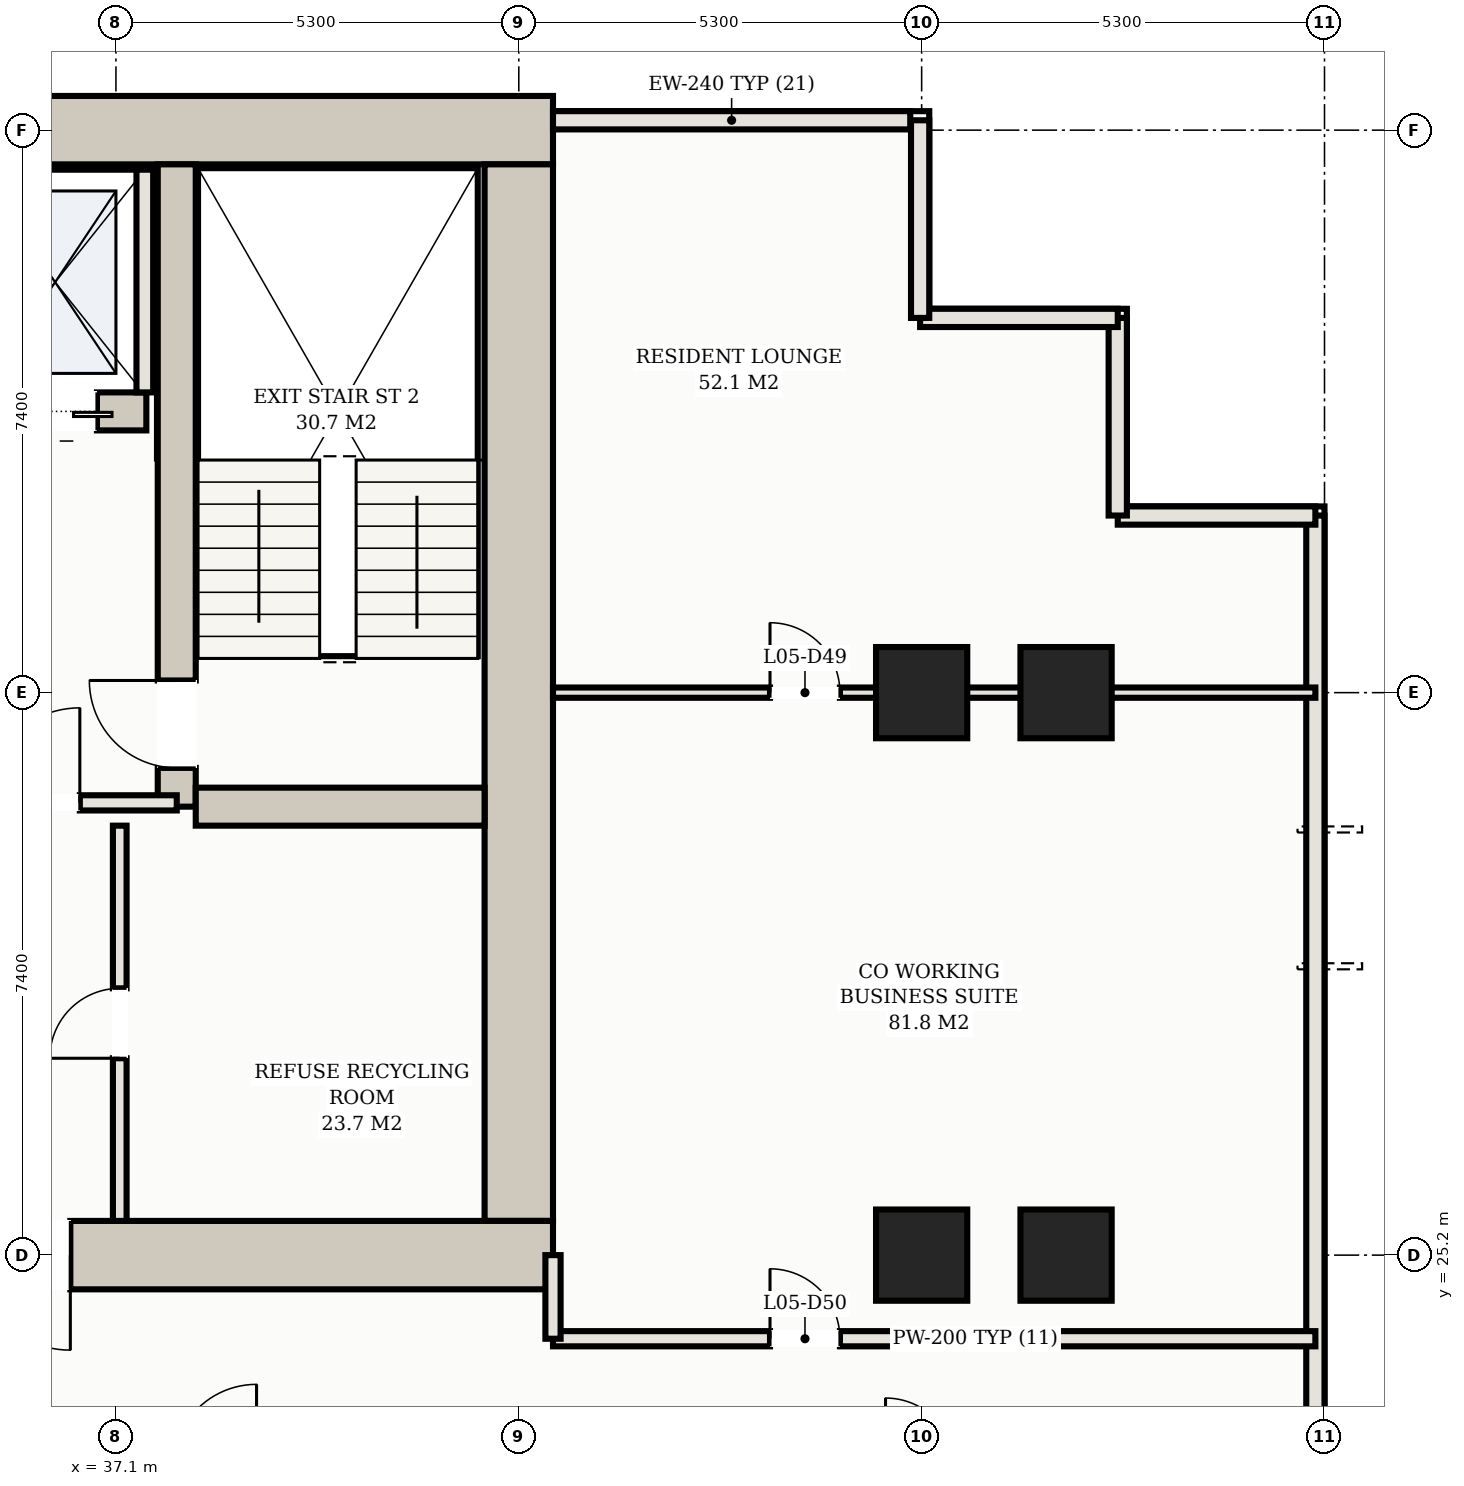
"""IFC4 building model, lengths in metres.
Left out: names, types, materials, properties, quantities, classifications, styles, units other than length and angle.
Written with IfcOpenShell. Run it as: python <this file> out.ifc"""

import sys

from ifc_helpers import new_model, si_unit, direction, frame, frame_2d, origin, origin_2d, place, context, subcontext, project, spatial, rectangle, hollow_rectangle, extrude, element, fill, save


model = new_model("IFC4")
c1 = context("Model", 3, precision=1e-05, world=origin(), true_north=direction((0.0, 1.0)))
c2 = subcontext(c1, "Body", "Model", "MODEL_VIEW")
j1 = project(units=[si_unit("LENGTHUNIT", "METRE"), si_unit("PLANEANGLEUNIT", "RADIAN")], contexts=[c1])
p1 = place(None, origin())
s1 = spatial("IfcSite", under=j1, at=p1, CompositionType="ELEMENT")
p2 = place(p1, origin())
s2 = spatial("IfcBuilding", under=s1, at=p2, CompositionType="ELEMENT")
p3 = place(p2, frame((0.0, 0.0, 24.2)))
s3 = spatial("IfcBuildingStorey", under=s2, at=p3, CompositionType="ELEMENT", Elevation=24.2)
p4 = place(p3, frame((10.15, 40.0, 0.0), z_axis=(0.0, 0.0, 1.0), x_axis=(1.0, 0.0, 0.0)))
e1 = element("IfcWall", 1, at=p4, inside=s3, PredefinedType="SHEAR", context=c2, shape_type="SweptSolid", body=[
    extrude(rectangle(XDim=32.7, YDim=0.9, at=frame_2d((16.35, 0.0))), origin(), (0.0, 0.0, 1.0), 3.08),
])
p5 = place(p3, frame((42.4, 25.65, 0.0), z_axis=(0.0, 0.0, 1.0), x_axis=(0.0, 1.0, 0.0)))
e2 = element("IfcWall", 2, at=p5, inside=s3, PredefinedType="SHEAR", context=c2, shape_type="SweptSolid", body=[
    extrude(rectangle(XDim=13.9, YDim=0.9, at=frame_2d((6.95, 0.0))), origin(), (0.0, 0.0, 1.0), 3.08),
])
p6 = place(p3, frame((34.6, 25.2, 0.0), z_axis=(0.0, 0.0, 1.0), x_axis=(1.0, 0.0, 0.0)))
e3 = element("IfcWall", 3, at=p6, inside=s3, PredefinedType="SHEAR", context=c2, shape_type="SweptSolid", body=[
    extrude(rectangle(XDim=8.25, YDim=0.9, at=frame_2d((4.125, 0.0))), origin(), (0.0, 0.0, 1.0), 3.08),
])
p7 = place(p6, frame((0.65, 0.0, 0.0)))
e4 = element("IfcOpeningElement", 4, at=p7, cuts=e3, PredefinedType="OPENING", context=c2, shape_type="SweptSolid", body=[
    extrude(rectangle(XDim=1.25, YDim=2.2, at=frame_2d((0.625, 1.1))), frame((0.0, 0.46, 0.0), z_axis=(0.0, -1.0, 0.0), x_axis=(1.0, 0.0, 0.0)), (0.0, 0.0, 1.0), 0.92),
])
p8 = place(p3, frame((37.9, 31.1, 0.0), z_axis=(0.0, 0.0, 1.0), x_axis=(0.0, 1.0, 0.0)))
e5 = element("IfcWall", 5, at=p8, inside=s3, PredefinedType="SHEAR", context=c2, shape_type="SweptSolid", body=[
    extrude(rectangle(XDim=8.45, YDim=0.5, at=frame_2d((4.225, 0.0))), origin(), (0.0, 0.0, 1.0), 3.08),
])
p9 = place(p8, frame((0.51, 0.0, 0.0)))
e6 = element("IfcOpeningElement", 6, at=p9, cuts=e5, PredefinedType="OPENING", context=c2, shape_type="SweptSolid", body=[
    extrude(rectangle(XDim=1.15, YDim=2.2, at=frame_2d((0.575, 1.1))), frame((0.0, 0.26, 0.0), z_axis=(0.0, -1.0, 0.0), x_axis=(1.0, 0.0, 0.0)), (0.0, 0.0, 1.0), 0.52),
])
p10 = place(p3, frame((38.15, 31.1, 0.0), z_axis=(0.0, 0.0, 1.0), x_axis=(1.0, 0.0, 0.0)))
e7 = element("IfcWall", 7, at=p10, inside=s3, PredefinedType="SHEAR", context=c2, shape_type="SweptSolid", body=[
    extrude(rectangle(XDim=3.8, YDim=0.5, at=frame_2d((1.9, 0.0))), origin(), (0.0, 0.0, 1.0), 3.08),
])
p11 = place(p3, frame((15.5, 36.3, 0.0), z_axis=(0.0, 0.0, 1.0), x_axis=(1.0, 0.0, 0.0)))
e8 = element("IfcWall", 8, at=p11, inside=s3, PredefinedType="SHEAR", context=c2, shape_type="SweptSolid", body=[
    extrude(rectangle(XDim=22.0, YDim=0.5, at=frame_2d((11.0, 0.0))), origin(), (0.0, 0.0, 1.0), 3.08),
])
p12 = place(p11, frame((0.65, 0.0, 0.0)))
e9 = element("IfcOpeningElement", 9, at=p12, cuts=e8, PredefinedType="OPENING", context=c2, shape_type="SweptSolid", body=[
    extrude(rectangle(XDim=1.1, YDim=2.15, at=frame_2d((0.55, 1.075))), frame((0.0, 0.26, 0.0), z_axis=(0.0, -1.0, 0.0), x_axis=(1.0, 0.0, 0.0)), (0.0, 0.0, 1.0), 0.52),
])
p13 = place(p11, frame((20.25, 0.0, 0.0)))
e10 = element("IfcOpeningElement", 10, at=p13, cuts=e8, PredefinedType="OPENING", context=c2, shape_type="SweptSolid", body=[
    extrude(rectangle(XDim=1.1, YDim=2.15, at=frame_2d((0.55, 1.075))), frame((0.0, 0.26, 0.0), z_axis=(0.0, -1.0, 0.0), x_axis=(1.0, 0.0, 0.0)), (0.0, 0.0, 1.0), 0.52),
])
p14 = place(p11, frame((17.05, 0.0, 0.0)))
e11 = element("IfcOpeningElement", 11, at=p14, cuts=e8, PredefinedType="OPENING", context=c2, shape_type="SweptSolid", body=[
    extrude(rectangle(XDim=1.3, YDim=2.2, at=frame_2d((0.65, 1.1))), frame((0.0, 0.26, 0.0), z_axis=(0.0, -1.0, 0.0), x_axis=(1.0, 0.0, 0.0)), (0.0, 0.0, 1.0), 0.52),
])
for number, where, z_axis, x_axis in (
    (12, (47.7, 25.2, 0.0), (0.0, 0.0, 1.0), (1.0, 0.0, 0.0)),
    (13, (47.7, 32.6, 0.0), (0.0, 0.0, 1.0), (1.0, 0.0, 0.0)),
    (14, (49.6, 25.2, 0.0), (0.0, 0.0, 1.0), (1.0, 0.0, 0.0)),
    (15, (49.6, 32.6, 0.0), (0.0, 0.0, 1.0), (1.0, 0.0, 0.0)),
):
    element("IfcColumn", number, at=place(p3, frame(where, z_axis=z_axis, x_axis=x_axis)), inside=s3, PredefinedType="COLUMN", context=c2, shape_type="SweptSolid", body=[
        extrude(hollow_rectangle(XDim=1.2, YDim=1.2, WallThickness=0.04, at=origin_2d()), origin(), (0.0, 0.0, 1.0), 3.3),
    ])
p15 = place(p3, frame((37.48, 36.55, 0.0), z_axis=(0.0, 0.0, 1.0), x_axis=(0.0, 1.0, 0.0)))
e16 = element("IfcWall", 16, at=p15, inside=s3, PredefinedType="SOLIDWALL", context=c2, shape_type="SweptSolid", body=[
    extrude(rectangle(XDim=2.93, YDim=0.22, at=frame_2d((1.465, 0.0))), origin(), (0.0, 0.0, 1.0), 3.08),
])
p16 = place(p3, frame((52.88, 6.12, 0.0), z_axis=(0.0, 0.0, 1.0), x_axis=(0.0, 1.0, 0.0)))
e17 = element("IfcWall", 17, at=p16, inside=s3, PredefinedType="SOLIDWALL", context=c2, shape_type="SweptSolid", body=[
    extrude(rectangle(XDim=28.81, YDim=0.24, at=frame_2d((14.405, 0.0))), origin(), (0.0, 0.0, 1.0), 3.08),
])
p17 = place(p3, frame((52.88, 34.93, 0.0), z_axis=(0.0, 0.0, 1.0), x_axis=(-1.0, 0.0, 0.0)))
e18 = element("IfcWall", 18, at=p17, inside=s3, PredefinedType="SOLIDWALL", context=c2, shape_type="SweptSolid", body=[
    extrude(rectangle(XDim=2.6, YDim=0.24, at=frame_2d((1.3, 0.0))), origin(), (0.0, 0.0, 1.0), 3.08),
])
for number, where, z_axis, x_axis in (
    (19, (50.28, 34.93, 0.0), (0.0, 0.0, 1.0), (0.0, 1.0, 0.0)),
    (20, (50.28, 37.53, 0.0), (0.0, 0.0, 1.0), (-1.0, 0.0, 0.0)),
):
    element("IfcWall", number, at=place(p3, frame(where, z_axis=z_axis, x_axis=x_axis)), inside=s3, PredefinedType="SOLIDWALL", context=c2, shape_type="SweptSolid", body=[
        extrude(rectangle(XDim=2.6, YDim=0.24, at=frame_2d((1.3, 0.0))), origin(), (0.0, 0.0, 1.0), 3.08),
    ])
p18 = place(p3, frame((47.68, 37.53, 0.0), z_axis=(0.0, 0.0, 1.0), x_axis=(0.0, 1.0, 0.0)))
e21 = element("IfcWall", 21, at=p18, inside=s3, PredefinedType="SOLIDWALL", context=c2, shape_type="SweptSolid", body=[
    extrude(rectangle(XDim=2.6, YDim=0.24, at=frame_2d((1.3, 0.0))), origin(), (0.0, 0.0, 1.0), 3.08),
])
p19 = place(p3, frame((47.55, 40.13, 0.0), z_axis=(0.0, 0.0, 1.0), x_axis=(-1.0, 0.0, 0.0)))
e22 = element("IfcWall", 22, at=p19, inside=s3, PredefinedType="SOLIDWALL", context=c2, shape_type="SweptSolid", body=[
    extrude(rectangle(XDim=4.7, YDim=0.24, at=frame_2d((2.35, 0.0))), origin(), (0.0, 0.0, 1.0), 3.08),
])
p20 = place(p3, frame((34.65, 31.15, 0.0), z_axis=(0.0, 0.0, 1.0), x_axis=(1.0, 0.0, 0.0)))
e23 = element("IfcWall", 23, at=p20, inside=s3, PredefinedType="PARTITIONING", context=c2, shape_type="SweptSolid", body=[
    extrude(rectangle(XDim=3.25, YDim=0.2, at=frame_2d((1.625, 0.0))), origin(), (0.0, 0.0, 1.0), 2.57),
])
p21 = place(p20, frame((0.725, 0.0, 0.0)))
e24 = element("IfcOpeningElement", 24, at=p21, cuts=e23, PredefinedType="OPENING", context=c2, shape_type="SweptSolid", body=[
    extrude(rectangle(XDim=1.25, YDim=2.2, at=frame_2d((0.625, 1.1))), frame((0.0, 0.11, 0.0), z_axis=(0.0, -1.0, 0.0), x_axis=(1.0, 0.0, 0.0)), (0.0, 0.0, 1.0), 0.22),
])
p22 = place(p3, frame((37.15, 25.65, 0.0), z_axis=(0.0, 0.0, 1.0), x_axis=(0.0, 1.0, 0.0)))
e25 = element("IfcWall", 25, at=p22, inside=s3, PredefinedType="PARTITIONING", context=c2, shape_type="SweptSolid", body=[
    extrude(rectangle(XDim=5.2, YDim=0.18, at=frame_2d((2.6, 0.0))), origin(), (0.0, 0.0, 1.0), 2.57),
])
p23 = place(p22, frame((2.14, 0.0, 0.0)))
e26 = element("IfcOpeningElement", 26, at=p23, cuts=e25, PredefinedType="OPENING", context=c2, shape_type="SweptSolid", body=[
    extrude(rectangle(XDim=0.92, YDim=2.15, at=frame_2d((0.46, 1.075))), frame((0.0, 0.1, 0.0), z_axis=(0.0, -1.0, 0.0), x_axis=(1.0, 0.0, 0.0)), (0.0, 0.0, 1.0), 0.2),
])
p24 = place(p3, frame((42.85, 24.1, 0.0), z_axis=(0.0, 0.0, 1.0), x_axis=(1.0, 0.0, 0.0)))
e27 = element("IfcWall", 27, at=p24, inside=s3, PredefinedType="PARTITIONING", context=c2, shape_type="SweptSolid", body=[
    extrude(rectangle(XDim=10.03, YDim=0.2, at=frame_2d((5.015, 0.0))), origin(), (0.0, 0.0, 1.0), 2.57),
])
p25 = place(p24, frame((2.855, 0.0, 0.0)))
e28 = element("IfcOpeningElement", 28, at=p25, cuts=e27, PredefinedType="OPENING", context=c2, shape_type="SweptSolid", body=[
    extrude(rectangle(XDim=0.92, YDim=2.15, at=frame_2d((0.46, 1.075))), frame((0.0, 0.11, 0.0), z_axis=(0.0, -1.0, 0.0), x_axis=(1.0, 0.0, 0.0)), (0.0, 0.0, 1.0), 0.22),
])
p26 = place(p3, frame((42.85, 24.1, 0.0), z_axis=(0.0, 0.0, 1.0), x_axis=(0.0, 1.0, 0.0)))
e29 = element("IfcWall", 29, at=p26, inside=s3, PredefinedType="PARTITIONING", context=c2, shape_type="SweptSolid", body=[
    extrude(rectangle(XDim=1.1, YDim=0.2, at=frame_2d((0.55, 0.0))), origin(), (0.0, 0.0, 1.0), 2.57),
])
p27 = place(p3, frame((42.85, 32.6, 0.0), z_axis=(0.0, 0.0, 1.0), x_axis=(1.0, 0.0, 0.0)))
e30 = element("IfcWall", 30, at=p27, inside=s3, PredefinedType="PARTITIONING", context=c2, shape_type="SweptSolid", body=[
    extrude(rectangle(XDim=10.03, YDim=0.135, at=frame_2d((5.015, 0.0))), origin(), (0.0, 0.0, 1.0), 2.275),
])
p28 = place(p27, frame((2.855, 0.0, 0.0)))
e31 = element("IfcOpeningElement", 31, at=p28, cuts=e30, PredefinedType="OPENING", context=c2, shape_type="SweptSolid", body=[
    extrude(rectangle(XDim=0.92, YDim=2.15, at=frame_2d((0.46, 1.075))), frame((0.0, 0.078, 0.0), z_axis=(0.0, -1.0, 0.0), x_axis=(1.0, 0.0, 0.0)), (0.0, 0.0, 1.0), 0.155),
])
p29 = place(p13, frame((1.1, 0.0, 0.0), z_axis=(0.0, 0.0, 1.0), x_axis=(-1.0, 0.0, 0.0)))
e32 = element("IfcDoor", 32, at=p29, inside=s3, OperationType="DOUBLE_DOOR_SLIDING", PredefinedType="DOOR", context=c2, shape_type="SweptSolid", body=[
    extrude(rectangle(XDim=1.1, YDim=2.15, at=frame_2d((0.55, 1.075))), frame((0.0, 0.025, 0.0), z_axis=(0.0, -1.0, 0.0), x_axis=(1.0, 0.0, 0.0)), (0.0, 0.0, 1.0), 0.05),
])
fill(e10, e32)
p30 = place(p7, frame((1.25, 0.0, 0.0), z_axis=(0.0, 0.0, 1.0), x_axis=(-1.0, 0.0, 0.0)))
e33 = element("IfcDoor", 33, at=p30, inside=s3, OperationType="SINGLE_SWING_LEFT", PredefinedType="DOOR", context=c2, shape_type="SweptSolid", body=[
    extrude(rectangle(XDim=1.25, YDim=2.2, at=frame_2d((0.625, 1.1))), frame((0.0, 0.025, 0.0), z_axis=(0.0, -1.0, 0.0), x_axis=(1.0, 0.0, 0.0)), (0.0, 0.0, 1.0), 0.05),
])
fill(e4, e33)
p31 = place(p21, origin())
e34 = element("IfcDoor", 34, at=p31, inside=s3, OperationType="SINGLE_SWING_RIGHT", PredefinedType="DOOR", context=c2, shape_type="SweptSolid", body=[
    extrude(rectangle(XDim=1.25, YDim=2.2, at=frame_2d((0.625, 1.1))), frame((0.0, 0.025, 0.0), z_axis=(0.0, -1.0, 0.0), x_axis=(1.0, 0.0, 0.0)), (0.0, 0.0, 1.0), 0.05),
])
fill(e24, e34)
p32 = place(p9, origin())
e35 = element("IfcDoor", 35, at=p32, inside=s3, OperationType="SINGLE_SWING_RIGHT", PredefinedType="DOOR", context=c2, shape_type="SweptSolid", body=[
    extrude(rectangle(XDim=1.15, YDim=2.2, at=frame_2d((0.575, 1.1))), frame((0.0, 0.025, 0.0), z_axis=(0.0, -1.0, 0.0), x_axis=(1.0, 0.0, 0.0)), (0.0, 0.0, 1.0), 0.05),
])
fill(e6, e35)
p33 = place(p23, origin())
e36 = element("IfcDoor", 36, at=p33, inside=s3, OperationType="SINGLE_SWING_LEFT", PredefinedType="DOOR", context=c2, shape_type="SweptSolid", body=[
    extrude(rectangle(XDim=0.92, YDim=2.15, at=frame_2d((0.46, 1.075))), frame((0.0, 0.025, 0.0), z_axis=(0.0, -1.0, 0.0), x_axis=(1.0, 0.0, 0.0)), (0.0, 0.0, 1.0), 0.05),
])
fill(e26, e36)
p34 = place(p28, origin())
e37 = element("IfcDoor", 37, at=p34, inside=s3, OperationType="SINGLE_SWING_LEFT", PredefinedType="DOOR", context=c2, shape_type="SweptSolid", body=[
    extrude(rectangle(XDim=0.92, YDim=2.15, at=frame_2d((0.46, 1.075))), frame((0.0, 0.025, 0.0), z_axis=(0.0, -1.0, 0.0), x_axis=(1.0, 0.0, 0.0)), (0.0, 0.0, 1.0), 0.05),
])
fill(e31, e37)
p35 = place(p25, origin())
e38 = element("IfcDoor", 38, at=p35, inside=s3, OperationType="SINGLE_SWING_LEFT", PredefinedType="DOOR", context=c2, shape_type="SweptSolid", body=[
    extrude(rectangle(XDim=0.92, YDim=2.15, at=frame_2d((0.46, 1.075))), frame((0.0, 0.025, 0.0), z_axis=(0.0, -1.0, 0.0), x_axis=(1.0, 0.0, 0.0)), (0.0, 0.0, 1.0), 0.05),
])
fill(e28, e38)
save(model, sys.argv[1])
